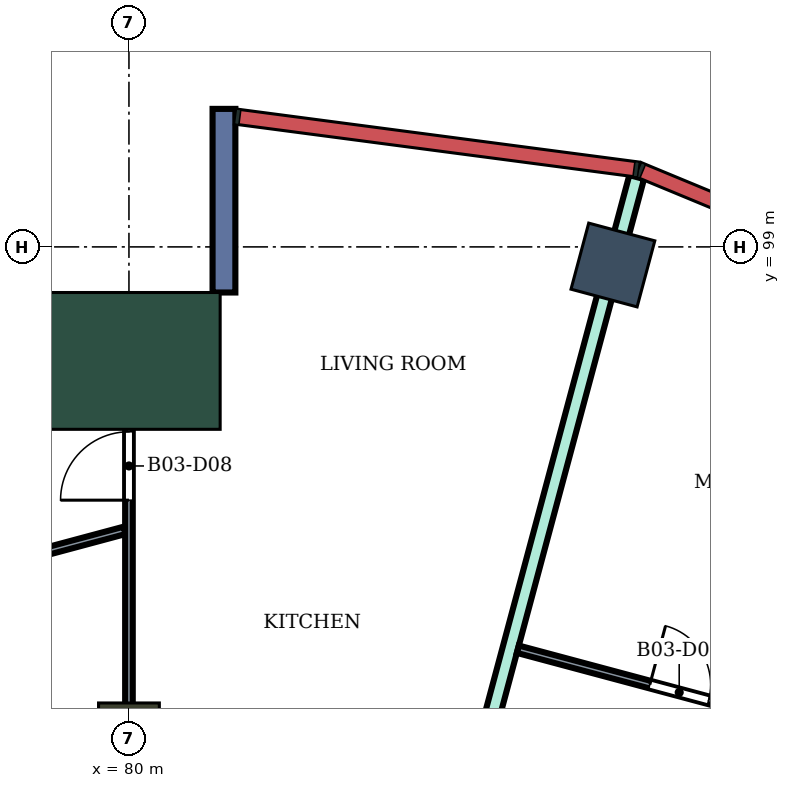
"""IFC4 building model, lengths in metres.
Left out: names, types, materials, properties, quantities, classifications, styles, units other than length and angle.
Written with IfcOpenShell. Run it as: python <this file> out.ifc"""

import sys

from ifc_helpers import new_model, si_unit, direction, frame, frame_2d, origin, origin_2d, place, context, subcontext, project, spatial, rectangle, extrude, element, fill, save


model = new_model("IFC4")
c1 = context("Model", 3, precision=1e-05, world=origin(), true_north=direction((0.0, 1.0)))
c2 = subcontext(c1, "Body", "Model", "MODEL_VIEW")
j1 = project(units=[si_unit("LENGTHUNIT", "METRE"), si_unit("PLANEANGLEUNIT", "RADIAN")], contexts=[c1])
p1 = place(None, origin())
s1 = spatial("IfcSite", under=j1, at=p1, CompositionType="ELEMENT")
p2 = place(p1, origin())
s2 = spatial("IfcBuilding", under=s1, at=p2, CompositionType="ELEMENT")
p3 = place(p2, frame((0.0, 0.0, 237.3)))
s3 = spatial("IfcBuildingStorey", under=s2, at=p3, CompositionType="ELEMENT", Elevation=237.3)
p4 = place(p3, frame((86.367, 98.762, 0.0), z_axis=(0.0, 0.0, 1.0), x_axis=(0.258819045103, 0.965925826289, 0.0)))
e1 = element("IfcColumn", 1, at=p4, inside=s3, PredefinedType="COLUMN", context=c2, shape_type="SweptSolid", body=[
    extrude(rectangle(XDim=0.9, YDim=0.9, at=origin_2d()), origin(), (0.0, 0.0, 1.0), 4.2),
])
p5 = place(p3, frame((80.0, 92.6, 0.0), z_axis=(0.0, 0.0, 1.0), x_axis=(0.0, 1.0, 0.0)))
e2 = element("IfcColumn", 2, at=p5, inside=s3, PredefinedType="COLUMN", context=c2, shape_type="SweptSolid", body=[
    extrude(rectangle(XDim=0.8, YDim=0.8, at=origin_2d()), origin(), (0.0, 0.0, 1.0), 4.2),
])
p6 = place(p3, frame((80.0, 97.5, 0.0), z_axis=(0.0, 0.0, 1.0), x_axis=(0.0, 1.0, 0.0)))
e3 = element("IfcColumn", 3, at=p6, inside=s3, PredefinedType="COLUMN", context=c2, shape_type="SweptSolid", body=[
    extrude(rectangle(XDim=1.8, YDim=2.4, at=origin_2d()), origin(), (0.0, 0.0, 1.0), 4.2),
])
p7 = place(p3, frame((81.25, 98.4, 0.0), z_axis=(0.0, 0.0, 1.0), x_axis=(0.0, 1.0, 0.0)))
e4 = element("IfcWall", 4, at=p7, inside=s3, PredefinedType="NOTDEFINED", context=c2, shape_type="SweptSolid", body=[
    extrude(rectangle(XDim=2.416, YDim=0.3, at=frame_2d((1.208, 0.0))), origin(), (0.0, 0.0, 1.0), 4.2),
])
p8 = place(p3, frame((83.335, 87.456, 0.0), z_axis=(0.0, 0.0, 1.0), x_axis=(0.259184958139, 0.965827705895, 0.0)))
e5 = element("IfcWall", 5, at=p8, inside=s3, PredefinedType="PARTITIONING", context=c2, shape_type="SweptSolid", body=[
    extrude(rectangle(XDim=12.904, YDim=0.2, at=frame_2d((6.452, 0.0))), origin(), (0.0, 0.0, 1.0), 3.75),
])
p9 = place(p3, frame((75.035, 93.955, 0.0), z_axis=(0.0, 0.0, 1.0), x_axis=(0.965868648254, 0.259032342228, 0.0)))
e6 = element("IfcWall", 6, at=p9, inside=s3, PredefinedType="PARTITIONING", context=c2, shape_type="SweptSolid", body=[
    extrude(rectangle(XDim=5.08, YDim=0.1, at=frame_2d((2.54, 0.0))), origin(), (0.0, 0.0, 1.0), 3.75),
])
p10 = place(p3, frame((80.0, 88.246, 0.0), z_axis=(0.0, 0.0, 1.0), x_axis=(0.0, 1.0, 0.0)))
e7 = element("IfcWall", 7, at=p10, inside=s3, PredefinedType="PARTITIONING", context=c2, shape_type="SweptSolid", body=[
    extrude(rectangle(XDim=9.954, YDim=0.1, at=frame_2d((4.977, 0.0))), origin(), (0.0, 0.0, 1.0), 3.75),
])
p11 = place(p10, frame((7.422, 0.0, 0.0)))
e8 = element("IfcOpeningElement", 8, at=p11, cuts=e7, PredefinedType="OPENING", context=c2, shape_type="SweptSolid", body=[
    extrude(rectangle(XDim=0.9, YDim=2.1, at=frame_2d((0.45, 1.05))), frame((0.0, 0.06, 0.0), z_axis=(0.0, -1.0, 0.0), x_axis=(1.0, 0.0, 0.0)), (0.0, 0.0, 1.0), 0.12),
])
p12 = place(p10, frame((3.12, 0.0, 0.0)))
e9 = element("IfcOpeningElement", 9, at=p12, cuts=e7, PredefinedType="OPENING", context=c2, shape_type="SweptSolid", body=[
    extrude(rectangle(XDim=0.8, YDim=2.1, at=frame_2d((0.4, 1.05))), frame((0.0, 0.06, 0.0), z_axis=(0.0, -1.0, 0.0), x_axis=(1.0, 0.0, 0.0)), (0.0, 0.0, 1.0), 0.12),
])
p13 = place(p3, frame((85.116, 93.707, 0.0), z_axis=(0.0, 0.0, 1.0), x_axis=(0.965979414561, -0.258618968068, 0.0)))
e10 = element("IfcWall", 10, at=p13, inside=s3, PredefinedType="PARTITIONING", context=c2, shape_type="SweptSolid", body=[
    extrude(rectangle(XDim=5.036, YDim=0.1, at=frame_2d((2.518, 0.0))), origin(), (0.0, 0.0, 1.0), 3.75),
])
p14 = place(p13, frame((1.798, 0.0, 0.0)))
e11 = element("IfcOpeningElement", 11, at=p14, cuts=e10, PredefinedType="OPENING", context=c2, shape_type="SweptSolid", body=[
    extrude(rectangle(XDim=0.8, YDim=2.1, at=frame_2d((0.4, 1.05))), frame((0.0, 0.06, 0.0), z_axis=(0.0, -1.0, 0.0), x_axis=(1.0, 0.0, 0.0)), (0.0, 0.0, 1.0), 0.12),
])
p15 = place(p3, frame((86.671, 86.554, 0.0), z_axis=(0.0, 0.0, 1.0), x_axis=(0.500104188531, 0.865965242151, 0.0)))
e12 = element("IfcWall", 12, at=p15, inside=s3, PredefinedType="PARTITIONING", context=c2, shape_type="SweptSolid", body=[
    extrude(rectangle(XDim=12.456, YDim=0.1, at=frame_2d((6.228, 0.0))), origin(), (0.0, 0.0, 1.0), 3.75),
])
p16 = place(p15, frame((9.111, 0.0, 0.0)))
e13 = element("IfcOpeningElement", 13, at=p16, cuts=e12, PredefinedType="OPENING", context=c2, shape_type="SweptSolid", body=[
    extrude(rectangle(XDim=0.9, YDim=2.1, at=frame_2d((0.45, 1.05))), frame((0.0, 0.06, 0.0), z_axis=(0.0, -1.0, 0.0), x_axis=(1.0, 0.0, 0.0)), (0.0, 0.0, 1.0), 0.12),
])
p17 = place(p14, origin())
e14 = element("IfcDoor", 14, at=p17, inside=s3, OperationType="SINGLE_SWING_LEFT", PredefinedType="DOOR", context=c2, shape_type="SweptSolid", body=[
    extrude(rectangle(XDim=0.8, YDim=2.1, at=frame_2d((0.4, 1.05))), frame((0.0, 0.025, 0.0), z_axis=(0.0, -1.0, 0.0), x_axis=(1.0, 0.0, 0.0)), (0.0, 0.0, 1.0), 0.05),
])
fill(e11, e14)
p18 = place(p11, origin())
e15 = element("IfcDoor", 15, at=p18, inside=s3, OperationType="SINGLE_SWING_LEFT", PredefinedType="DOOR", context=c2, shape_type="SweptSolid", body=[
    extrude(rectangle(XDim=0.9, YDim=2.1, at=frame_2d((0.45, 1.05))), frame((0.0, 0.025, 0.0), z_axis=(0.0, -1.0, 0.0), x_axis=(1.0, 0.0, 0.0)), (0.0, 0.0, 1.0), 0.05),
])
fill(e8, e15)
save(model, sys.argv[1])
